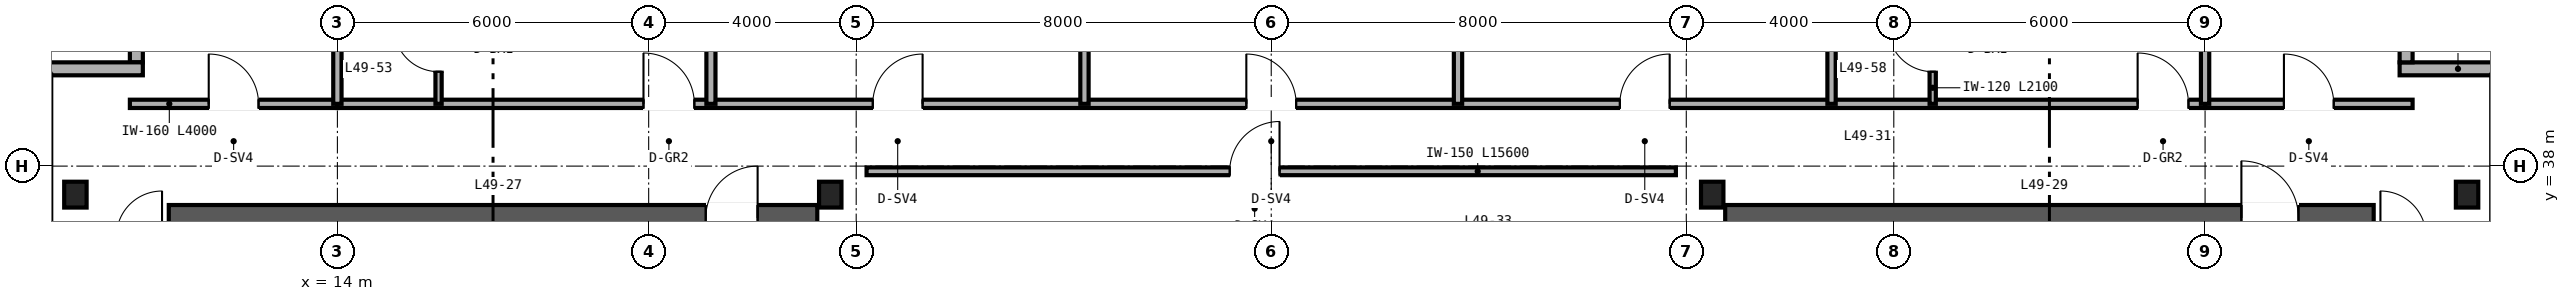
"""IFC4 building model, lengths in metres.
Left out: names, types, materials, properties, quantities, classifications, styles, units other than length and angle.
Written with IfcOpenShell. Run it as: python <this file> out.ifc"""

import sys

from ifc_helpers import new_model, si_unit, direction, frame, frame_2d, origin, origin_2d, place, context, subcontext, project, spatial, rectangle, i_section, extrude, source, transform, mapped, element, fill, save


model = new_model("IFC4")
c1 = context("Model", 3, precision=1e-05, world=origin(), true_north=direction((0.0, 1.0)))
c2 = subcontext(c1, "Body", "Model", "MODEL_VIEW")
j1 = project(units=[si_unit("LENGTHUNIT", "METRE"), si_unit("PLANEANGLEUNIT", "RADIAN")], contexts=[c1])
p1 = place(None, origin())
s1 = spatial("IfcSite", under=j1, at=p1, CompositionType="ELEMENT")
p2 = place(p1, origin())
s2 = spatial("IfcBuilding", under=s1, at=p2, CompositionType="ELEMENT")
p3 = place(p2, frame((0.0, 0.0, 195.6)))
s3 = spatial("IfcBuildingStorey", under=s2, at=p3, CompositionType="ELEMENT", Elevation=195.6)
p4 = place(p3, frame((10.75, 37.0, 0.0), z_axis=(0.0, 0.0, 1.0), x_axis=(1.0, 0.0, 0.0)))
e1 = element("IfcWall", 1, at=p4, inside=s3, PredefinedType="SHEAR", context=c2, shape_type="SweptSolid", body=[
    extrude(rectangle(XDim=12.5, YDim=0.5, at=frame_2d((6.25, 0.0))), origin(), (0.0, 0.0, 1.0), 3.37),
])
p5 = place(p4, frame((10.35, 0.0, 0.0)))
e2 = element("IfcOpeningElement", 2, at=p5, cuts=e1, PredefinedType="OPENING", context=c2, shape_type="SweptSolid", body=[
    extrude(rectangle(XDim=1.0, YDim=2.15, at=frame_2d((0.5, 1.075))), frame((0.0, 0.26, 0.0), z_axis=(0.0, -1.0, 0.0), x_axis=(1.0, 0.0, 0.0)), (0.0, 0.0, 1.0), 0.52),
])
p6 = place(p3, frame((40.75, 37.0, 0.0), z_axis=(0.0, 0.0, 1.0), x_axis=(1.0, 0.0, 0.0)))
e3 = element("IfcWall", 3, at=p6, inside=s3, PredefinedType="SHEAR", context=c2, shape_type="SweptSolid", body=[
    extrude(rectangle(XDim=12.5, YDim=0.5, at=frame_2d((6.25, 0.0))), origin(), (0.0, 0.0, 1.0), 3.37),
])
p7 = place(p6, frame((9.95, 0.0, 0.0)))
e4 = element("IfcOpeningElement", 4, at=p7, cuts=e3, PredefinedType="OPENING", context=c2, shape_type="SweptSolid", body=[
    extrude(rectangle(XDim=1.1, YDim=2.15, at=frame_2d((0.55, 1.075))), frame((0.0, 0.26, 0.0), z_axis=(0.0, -1.0, 0.0), x_axis=(1.0, 0.0, 0.0)), (0.0, 0.0, 1.0), 0.52),
])
m1 = source(origin(), c2, "Body", "SweptSolid", [
    extrude(i_section(OverallWidth=0.432, OverallDepth=0.498, WebThickness=0.056, FlangeThickness=0.089, FilletRadius=0.025, at=origin_2d()), origin(), (0.0, 0.0, 1.0), 3.37),
])
for number, where, z_axis, x_axis in (
    (5, (8.95, 37.45, 0.0), (0.0, 0.0, 1.0), (1.0, 0.0, 0.0)),
    (6, (23.5, 37.45, 0.0), (0.0, 0.0, 1.0), (1.0, 0.0, 0.0)),
    (7, (40.5, 37.45, 0.0), (0.0, 0.0, 1.0), (1.0, 0.0, 0.0)),
    (8, (55.05, 37.45, 0.0), (0.0, 0.0, 1.0), (1.0, 0.0, 0.0)),
):
    element("IfcColumn", number, at=place(p3, frame(where, z_axis=z_axis, x_axis=x_axis)), inside=s3, PredefinedType="COLUMN", context=c2, shape_type="MappedRepresentation", body=[
        mapped(m1, transform((0.0, 0.0, 0.0), scale=1.0)),
    ])
p8 = place(p3, frame((56.0, 39.875, 0.0), z_axis=(0.0, 0.0, 1.0), x_axis=(-1.0, 0.0, 0.0)))
e9 = element("IfcWall", 9, at=p8, inside=s3, PredefinedType="SOLIDWALL", context=c2, shape_type="SweptSolid", body=[
    extrude(rectangle(XDim=2.25, YDim=0.25, at=frame_2d((1.125, 0.0))), origin(), (0.0, 0.0, 1.0), 3.37),
])
for number, where, z_axis, x_axis in (
    (10, (53.875, 40.0, 0.0), (0.0, 0.0, 1.0), (0.0, 1.0, 0.0)),
    (11, (10.125, 42.0, 0.0), (0.0, 0.0, 1.0), (0.0, -1.0, 0.0)),
):
    element("IfcWall", number, at=place(p3, frame(where, z_axis=z_axis, x_axis=x_axis)), inside=s3, PredefinedType="SOLIDWALL", context=c2, shape_type="SweptSolid", body=[
        extrude(rectangle(XDim=2.0, YDim=0.25, at=frame_2d((1.0, 0.0))), origin(), (0.0, 0.0, 1.0), 3.37),
    ])
p9 = place(p3, frame((10.25, 39.875, 0.0), z_axis=(0.0, 0.0, 1.0), x_axis=(-1.0, 0.0, 0.0)))
e12 = element("IfcWall", 12, at=p9, inside=s3, PredefinedType="SOLIDWALL", context=c2, shape_type="SweptSolid", body=[
    extrude(rectangle(XDim=2.25, YDim=0.25, at=frame_2d((1.125, 0.0))), origin(), (0.0, 0.0, 1.0), 3.37),
])
p10 = place(p3, frame((24.2, 37.9, 0.0), z_axis=(0.0, 0.0, 1.0), x_axis=(1.0, 0.0, 0.0)))
e13 = element("IfcWall", 13, at=p10, inside=s3, PredefinedType="PARTITIONING", context=c2, shape_type="SweptSolid", body=[
    extrude(rectangle(XDim=15.6, YDim=0.15, at=frame_2d((7.8, 0.0))), origin(), (0.0, 0.0, 1.0), 3.37),
])
p11 = place(p10, frame((7.0, 0.0, 0.0)))
e14 = element("IfcOpeningElement", 14, at=p11, cuts=e13, PredefinedType="OPENING", context=c2, shape_type="SweptSolid", body=[
    extrude(rectangle(XDim=0.96, YDim=2.15, at=frame_2d((0.48, 1.075))), frame((0.0, 0.085, 0.0), z_axis=(0.0, -1.0, 0.0), x_axis=(1.0, 0.0, 0.0)), (0.0, 0.0, 1.0), 0.17),
])
p12 = place(p3, frame((10.0, 39.2, 0.0), z_axis=(0.0, 0.0, 1.0), x_axis=(1.0, 0.0, 0.0)))
e15 = element("IfcWall", 15, at=p12, inside=s3, PredefinedType="PARTITIONING", context=c2, shape_type="SweptSolid", body=[
    extrude(rectangle(XDim=4.0, YDim=0.16, at=frame_2d((2.0, 0.0))), origin(), (0.0, 0.0, 1.0), 3.37),
])
p13 = place(p12, frame((1.52, 0.0, 0.0)))
e16 = element("IfcOpeningElement", 16, at=p13, cuts=e15, PredefinedType="OPENING", context=c2, shape_type="SweptSolid", body=[
    extrude(rectangle(XDim=0.96, YDim=2.15, at=frame_2d((0.48, 1.075))), frame((0.0, 0.09, 0.0), z_axis=(0.0, -1.0, 0.0), x_axis=(1.0, 0.0, 0.0)), (0.0, 0.0, 1.0), 0.18),
])
p14 = place(p3, frame((50.0, 39.2, 0.0), z_axis=(0.0, 0.0, 1.0), x_axis=(1.0, 0.0, 0.0)))
e17 = element("IfcWall", 17, at=p14, inside=s3, PredefinedType="PARTITIONING", context=c2, shape_type="SweptSolid", body=[
    extrude(rectangle(XDim=4.0, YDim=0.16, at=frame_2d((2.0, 0.0))), origin(), (0.0, 0.0, 1.0), 3.37),
])
p15 = place(p14, frame((1.52, 0.0, 0.0)))
e18 = element("IfcOpeningElement", 18, at=p15, cuts=e17, PredefinedType="OPENING", context=c2, shape_type="SweptSolid", body=[
    extrude(rectangle(XDim=0.96, YDim=2.15, at=frame_2d((0.48, 1.075))), frame((0.0, 0.09, 0.0), z_axis=(0.0, -1.0, 0.0), x_axis=(1.0, 0.0, 0.0)), (0.0, 0.0, 1.0), 0.18),
])
p16 = place(p3, frame((14.0, 39.2, 0.0), z_axis=(0.0, 0.0, 1.0), x_axis=(1.0, 0.0, 0.0)))
e19 = element("IfcWall", 19, at=p16, inside=s3, PredefinedType="PARTITIONING", context=c2, shape_type="SweptSolid", body=[
    extrude(rectangle(XDim=36.0, YDim=0.16, at=frame_2d((18.0, 0.0))), origin(), (0.0, 0.0, 1.0), 2.913),
])
p17 = place(p16, frame((5.9, 0.0, 0.0)))
e20 = element("IfcOpeningElement", 20, at=p17, cuts=e19, PredefinedType="OPENING", context=c2, shape_type="SweptSolid", body=[
    extrude(rectangle(XDim=0.98, YDim=2.2, at=frame_2d((0.49, 1.1))), frame((0.0, 0.09, 0.0), z_axis=(0.0, -1.0, 0.0), x_axis=(1.0, 0.0, 0.0)), (0.0, 0.0, 1.0), 0.18),
])
p18 = place(p16, frame((10.32, 0.0, 0.0)))
e21 = element("IfcOpeningElement", 21, at=p18, cuts=e19, PredefinedType="OPENING", context=c2, shape_type="SweptSolid", body=[
    extrude(rectangle(XDim=0.96, YDim=2.15, at=frame_2d((0.48, 1.075))), frame((0.0, 0.09, 0.0), z_axis=(0.0, -1.0, 0.0), x_axis=(1.0, 0.0, 0.0)), (0.0, 0.0, 1.0), 0.18),
])
p19 = place(p16, frame((17.52, 0.0, 0.0)))
e22 = element("IfcOpeningElement", 22, at=p19, cuts=e19, PredefinedType="OPENING", context=c2, shape_type="SweptSolid", body=[
    extrude(rectangle(XDim=0.96, YDim=2.15, at=frame_2d((0.48, 1.075))), frame((0.0, 0.09, 0.0), z_axis=(0.0, -1.0, 0.0), x_axis=(1.0, 0.0, 0.0)), (0.0, 0.0, 1.0), 0.18),
])
p20 = place(p16, frame((24.72, 0.0, 0.0)))
e23 = element("IfcOpeningElement", 23, at=p20, cuts=e19, PredefinedType="OPENING", context=c2, shape_type="SweptSolid", body=[
    extrude(rectangle(XDim=0.96, YDim=2.15, at=frame_2d((0.48, 1.075))), frame((0.0, 0.09, 0.0), z_axis=(0.0, -1.0, 0.0), x_axis=(1.0, 0.0, 0.0)), (0.0, 0.0, 1.0), 0.18),
])
p21 = place(p16, frame((34.7, 0.0, 0.0)))
e24 = element("IfcOpeningElement", 24, at=p21, cuts=e19, PredefinedType="OPENING", context=c2, shape_type="SweptSolid", body=[
    extrude(rectangle(XDim=0.98, YDim=2.2, at=frame_2d((0.49, 1.1))), frame((0.0, 0.09, 0.0), z_axis=(0.0, -1.0, 0.0), x_axis=(1.0, 0.0, 0.0)), (0.0, 0.0, 1.0), 0.18),
])
for number, where, z_axis, x_axis in (
    (25, (14.0, 39.2, 0.0), (0.0, 0.0, 1.0), (0.0, 1.0, 0.0)),
    (26, (50.0, 39.2, 0.0), (0.0, 0.0, 1.0), (0.0, 1.0, 0.0)),
):
    element("IfcWall", number, at=place(p3, frame(where, z_axis=z_axis, x_axis=x_axis)), inside=s3, PredefinedType="PARTITIONING", context=c2, shape_type="SweptSolid", body=[
        extrude(rectangle(XDim=6.44, YDim=0.16, at=frame_2d((3.22, 0.0))), origin(), (0.0, 0.0, 1.0), 2.677),
    ])
p22 = place(p3, frame((21.2, 39.2, 0.0), z_axis=(0.0, 0.0, 1.0), x_axis=(0.0, 1.0, 0.0)))
e27 = element("IfcWall", 27, at=p22, inside=s3, PredefinedType="PARTITIONING", context=c2, shape_type="SweptSolid", body=[
    extrude(rectangle(XDim=6.44, YDim=0.175, at=frame_2d((3.22, 0.0))), origin(), (0.0, 0.0, 1.0), 2.833),
])
p23 = place(p3, frame((15.95, 39.2, 0.0), z_axis=(0.0, 0.0, 1.0), x_axis=(0.0, 1.0, 0.0)))
e28 = element("IfcWall", 28, at=p23, inside=s3, PredefinedType="PARTITIONING", context=c2, shape_type="SweptSolid", body=[
    extrude(rectangle(XDim=2.1, YDim=0.12, at=frame_2d((1.05, 0.0))), origin(), (0.0, 0.0, 1.0), 3.37),
])
p24 = place(p23, frame((0.62, 0.0, 0.0)))
e29 = element("IfcOpeningElement", 29, at=p24, cuts=e28, PredefinedType="OPENING", context=c2, shape_type="SweptSolid", body=[
    extrude(rectangle(XDim=0.86, YDim=2.1, at=frame_2d((0.43, 1.05))), frame((0.0, 0.07, 0.0), z_axis=(0.0, -1.0, 0.0), x_axis=(1.0, 0.0, 0.0)), (0.0, 0.0, 1.0), 0.14),
])
for number, where, z_axis, x_axis in (
    (30, (28.4, 39.2, 0.0), (0.0, 0.0, 1.0), (0.0, 1.0, 0.0)),
    (31, (35.6, 39.2, 0.0), (0.0, 0.0, 1.0), (0.0, 1.0, 0.0)),
):
    element("IfcWall", number, at=place(p3, frame(where, z_axis=z_axis, x_axis=x_axis)), inside=s3, PredefinedType="PARTITIONING", context=c2, shape_type="SweptSolid", body=[
        extrude(rectangle(XDim=6.44, YDim=0.16, at=frame_2d((3.22, 0.0))), origin(), (0.0, 0.0, 1.0), 2.443),
    ])
p25 = place(p3, frame((42.8, 39.2, 0.0), z_axis=(0.0, 0.0, 1.0), x_axis=(0.0, 1.0, 0.0)))
e32 = element("IfcWall", 32, at=p25, inside=s3, PredefinedType="PARTITIONING", context=c2, shape_type="SweptSolid", body=[
    extrude(rectangle(XDim=6.44, YDim=0.16, at=frame_2d((3.22, 0.0))), origin(), (0.0, 0.0, 1.0), 2.833),
])
p26 = place(p3, frame((44.75, 39.2, 0.0), z_axis=(0.0, 0.0, 1.0), x_axis=(0.0, 1.0, 0.0)))
e33 = element("IfcWall", 33, at=p26, inside=s3, PredefinedType="PARTITIONING", context=c2, shape_type="SweptSolid", body=[
    extrude(rectangle(XDim=2.1, YDim=0.12, at=frame_2d((1.05, 0.0))), origin(), (0.0, 0.0, 1.0), 3.37),
])
p27 = place(p26, frame((0.62, 0.0, 0.0)))
e34 = element("IfcOpeningElement", 34, at=p27, cuts=e33, PredefinedType="OPENING", context=c2, shape_type="SweptSolid", body=[
    extrude(rectangle(XDim=0.86, YDim=2.1, at=frame_2d((0.43, 1.05))), frame((0.0, 0.07, 0.0), z_axis=(0.0, -1.0, 0.0), x_axis=(1.0, 0.0, 0.0)), (0.0, 0.0, 1.0), 0.14),
])
m2 = source(origin(), c2, "Body", "SweptSolid", [
    extrude(rectangle(XDim=1.0, YDim=2.15, at=frame_2d((0.5, 1.075))), frame((0.0, 0.025, 0.0), z_axis=(0.0, -1.0, 0.0), x_axis=(1.0, 0.0, 0.0)), (0.0, 0.0, 1.0), 0.05),
])
p28 = place(p5, origin())
e35 = element("IfcDoor", 35, at=p28, inside=s3, OperationType="SINGLE_SWING_RIGHT", PredefinedType="DOOR", context=c2, shape_type="MappedRepresentation", body=[
    mapped(m2, transform((0.0, 0.0, 0.0), scale=1.0)),
])
fill(e2, e35)
m3 = source(origin(), c2, "Body", "SweptSolid", [
    extrude(rectangle(XDim=1.1, YDim=2.15, at=frame_2d((0.55, 1.075))), frame((0.0, 0.025, 0.0), z_axis=(0.0, -1.0, 0.0), x_axis=(1.0, 0.0, 0.0)), (0.0, 0.0, 1.0), 0.05),
])
p29 = place(p7, origin())
e36 = element("IfcDoor", 36, at=p29, inside=s3, OperationType="SINGLE_SWING_LEFT", PredefinedType="DOOR", context=c2, shape_type="MappedRepresentation", body=[
    mapped(m3, transform((0.0, 0.0, 0.0), scale=1.0)),
])
fill(e4, e36)
m4 = source(origin(), c2, "Body", "SweptSolid", [
    extrude(rectangle(XDim=0.96, YDim=2.15, at=frame_2d((0.48, 1.075))), frame((0.0, 0.025, 0.0), z_axis=(0.0, -1.0, 0.0), x_axis=(1.0, 0.0, 0.0)), (0.0, 0.0, 1.0), 0.05),
])
p30 = place(p11, origin())
e37 = element("IfcDoor", 37, at=p30, inside=s3, OperationType="SINGLE_SWING_RIGHT", PredefinedType="DOOR", context=c2, shape_type="MappedRepresentation", body=[
    mapped(m4, transform((0.0, 0.0, 0.0), scale=1.0)),
])
fill(e14, e37)
p31 = place(p13, origin())
e38 = element("IfcDoor", 38, at=p31, inside=s3, OperationType="SINGLE_SWING_LEFT", PredefinedType="DOOR", context=c2, shape_type="MappedRepresentation", body=[
    mapped(m4, transform((0.0, 0.0, 0.0), scale=1.0)),
])
fill(e16, e38)
p32 = place(p15, origin())
e39 = element("IfcDoor", 39, at=p32, inside=s3, OperationType="SINGLE_SWING_LEFT", PredefinedType="DOOR", context=c2, shape_type="MappedRepresentation", body=[
    mapped(m4, transform((0.0, 0.0, 0.0), scale=1.0)),
])
fill(e18, e39)
m5 = source(origin(), c2, "Body", "SweptSolid", [
    extrude(rectangle(XDim=0.86, YDim=2.1, at=frame_2d((0.43, 1.05))), frame((0.0, 0.025, 0.0), z_axis=(0.0, -1.0, 0.0), x_axis=(1.0, 0.0, 0.0)), (0.0, 0.0, 1.0), 0.05),
])
p33 = place(p24, origin())
e40 = element("IfcDoor", 40, at=p33, inside=s3, OperationType="SINGLE_SWING_RIGHT", PredefinedType="DOOR", context=c2, shape_type="MappedRepresentation", body=[
    mapped(m5, transform((0.0, 0.0, 0.0), scale=1.0)),
])
fill(e29, e40)
p34 = place(p27, origin())
e41 = element("IfcDoor", 41, at=p34, inside=s3, OperationType="SINGLE_SWING_RIGHT", PredefinedType="DOOR", context=c2, shape_type="MappedRepresentation", body=[
    mapped(m5, transform((0.0, 0.0, 0.0), scale=1.0)),
])
fill(e34, e41)
m6 = source(origin(), c2, "Body", "SweptSolid", [
    extrude(rectangle(XDim=0.98, YDim=2.2, at=frame_2d((0.49, 1.1))), frame((0.0, 0.025, 0.0), z_axis=(0.0, -1.0, 0.0), x_axis=(1.0, 0.0, 0.0)), (0.0, 0.0, 1.0), 0.05),
])
p35 = place(p17, origin())
e42 = element("IfcDoor", 42, at=p35, inside=s3, OperationType="SINGLE_SWING_LEFT", PredefinedType="DOOR", context=c2, shape_type="MappedRepresentation", body=[
    mapped(m6, transform((0.0, 0.0, 0.0), scale=1.0)),
])
fill(e20, e42)
p36 = place(p18, origin())
e43 = element("IfcDoor", 43, at=p36, inside=s3, OperationType="SINGLE_SWING_RIGHT", PredefinedType="DOOR", context=c2, shape_type="MappedRepresentation", body=[
    mapped(m4, transform((0.0, 0.0, 0.0), scale=1.0)),
])
fill(e21, e43)
p37 = place(p19, origin())
e44 = element("IfcDoor", 44, at=p37, inside=s3, OperationType="SINGLE_SWING_LEFT", PredefinedType="DOOR", context=c2, shape_type="MappedRepresentation", body=[
    mapped(m4, transform((0.0, 0.0, 0.0), scale=1.0)),
])
fill(e22, e44)
p38 = place(p20, origin())
e45 = element("IfcDoor", 45, at=p38, inside=s3, OperationType="SINGLE_SWING_RIGHT", PredefinedType="DOOR", context=c2, shape_type="MappedRepresentation", body=[
    mapped(m4, transform((0.0, 0.0, 0.0), scale=1.0)),
])
fill(e23, e45)
p39 = place(p21, origin())
e46 = element("IfcDoor", 46, at=p39, inside=s3, OperationType="SINGLE_SWING_LEFT", PredefinedType="DOOR", context=c2, shape_type="MappedRepresentation", body=[
    mapped(m6, transform((0.0, 0.0, 0.0), scale=1.0)),
])
fill(e24, e46)
save(model, sys.argv[1])
